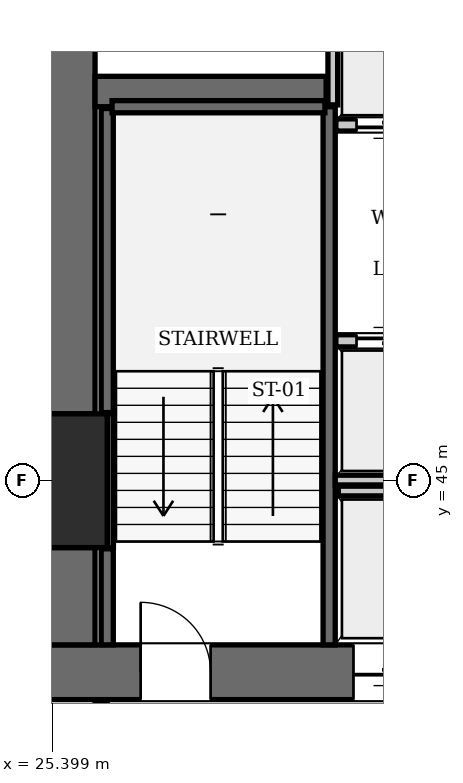
"""IFC4 building model, lengths in metres.
Left out: names, types, materials, properties, quantities, classifications, styles, units other than length and angle.
Written with IfcOpenShell. Run it as: python <this file> out.ifc"""

import sys

from ifc_helpers import new_model, si_unit, direction, frame, frame_2d, origin, origin_2d, place, context, subcontext, project, spatial, rectangle, extrude, element, fill, save


model = new_model("IFC4")
c1 = context("Model", 3, precision=1e-05, world=origin(), true_north=direction((0.0, 1.0)))
c2 = subcontext(c1, "Body", "Model", "MODEL_VIEW")
j1 = project(units=[si_unit("LENGTHUNIT", "METRE"), si_unit("PLANEANGLEUNIT", "RADIAN")], contexts=[c1])
p1 = place(None, origin())
s1 = spatial("IfcSite", under=j1, at=p1, CompositionType="ELEMENT")
p2 = place(p1, origin())
s2 = spatial("IfcBuilding", under=s1, at=p2, CompositionType="ELEMENT")
p3 = place(p2, frame((0.0, 0.0, 34.65)))
s3 = spatial("IfcBuildingStorey", under=s2, at=p3, CompositionType="ELEMENT", Elevation=34.65)
p4 = place(p3, frame((25.2, 45.0, 0.0), z_axis=(0.0, 0.0, 1.0), x_axis=(1.0, 0.0, 0.0)))
e1 = element("IfcColumn", 1, at=p4, inside=s3, PredefinedType="COLUMN", context=c2, shape_type="SweptSolid", body=[
    extrude(rectangle(XDim=2.2, YDim=2.2, at=origin_2d()), origin(), (0.0, 0.0, 1.0), 3.85),
])
p5 = place(p3, frame((25.2, 41.85, 0.0), z_axis=(0.0, 0.0, 1.0), x_axis=(1.0, 0.0, 0.0)))
e2 = element("IfcWall", 2, at=p5, inside=s3, PredefinedType="SHEAR", context=c2, shape_type="SweptSolid", body=[
    extrude(rectangle(XDim=6.8, YDim=0.9, at=frame_2d((3.4, 0.0))), origin(), (0.0, 0.0, 1.0), 3.85),
])
p6 = place(p5, frame((1.65, 0.0, 0.0)))
e3 = element("IfcOpeningElement", 3, at=p6, cuts=e2, PredefinedType="OPENING", context=c2, shape_type="SweptSolid", body=[
    extrude(rectangle(XDim=1.15, YDim=2.15, at=frame_2d((0.575, 1.075))), frame((0.0, 0.46, 0.0), z_axis=(0.0, -1.0, 0.0), x_axis=(1.0, 0.0, 0.0)), (0.0, 0.0, 1.0), 0.92),
])
p7 = place(p5, frame((5.15, 0.0, 0.0)))
e4 = element("IfcOpeningElement", 4, at=p7, cuts=e2, PredefinedType="OPENING", context=c2, shape_type="SweptSolid", body=[
    extrude(rectangle(XDim=1.1, YDim=2.2, at=frame_2d((0.55, 1.1))), frame((0.0, 0.46, 0.0), z_axis=(0.0, -1.0, 0.0), x_axis=(1.0, 0.0, 0.0)), (0.0, 0.0, 1.0), 0.92),
])
p8 = place(p3, frame((25.65, 42.3, 0.0), z_axis=(0.0, 0.0, 1.0), x_axis=(0.0, 1.0, 0.0)))
e5 = element("IfcWall", 5, at=p8, inside=s3, PredefinedType="SHEAR", context=c2, shape_type="SweptSolid", body=[
    extrude(rectangle(XDim=1.6, YDim=0.9, at=frame_2d((0.8, 0.0))), origin(), (0.0, 0.0, 1.0), 3.85),
])
p9 = place(p3, frame((25.65, 46.1, 0.0), z_axis=(0.0, 0.0, 1.0), x_axis=(0.0, 1.0, 0.0)))
e6 = element("IfcWall", 6, at=p9, inside=s3, PredefinedType="SHEAR", context=c2, shape_type="SweptSolid", body=[
    extrude(rectangle(XDim=7.0, YDim=0.9, at=frame_2d((3.5, 0.0))), origin(), (0.0, 0.0, 1.0), 3.85),
])
p10 = place(p3, frame((26.1, 51.4, 0.0), z_axis=(0.0, 0.0, 1.0), x_axis=(1.0, 0.0, 0.0)))
e7 = element("IfcWall", 7, at=p10, inside=s3, PredefinedType="SHEAR", context=c2, shape_type="SweptSolid", body=[
    extrude(rectangle(XDim=3.8, YDim=0.5, at=frame_2d((1.9, 0.0))), origin(), (0.0, 0.0, 1.0), 3.85),
])
p11 = place(p3, frame((29.95, 42.3, 0.0), z_axis=(0.0, 0.0, 1.0), x_axis=(0.0, 1.0, 0.0)))
e8 = element("IfcWall", 8, at=p11, inside=s3, PredefinedType="SOLIDWALL", context=c2, shape_type="SweptSolid", body=[
    extrude(rectangle(XDim=8.85, YDim=0.2, at=frame_2d((4.425, 0.0))), origin(), (0.0, 0.0, 1.0), 3.61),
])
p12 = place(p3, frame((26.3, 42.3, 0.0), z_axis=(0.0, 0.0, 1.0), x_axis=(0.0, 1.0, 0.0)))
e9 = element("IfcWall", 9, at=p12, inside=s3, PredefinedType="SOLIDWALL", context=c2, shape_type="SweptSolid", body=[
    extrude(rectangle(XDim=1.58, YDim=0.2, at=frame_2d((0.79, 0.0))), origin(), (0.0, 0.0, 1.0), 3.61),
])
p13 = place(p3, frame((26.3, 46.12, 0.0), z_axis=(0.0, 0.0, 1.0), x_axis=(0.0, 1.0, 0.0)))
e10 = element("IfcWall", 10, at=p13, inside=s3, PredefinedType="SOLIDWALL", context=c2, shape_type="SweptSolid", body=[
    extrude(rectangle(XDim=5.0, YDim=0.2, at=frame_2d((2.5, 0.0))), origin(), (0.0, 0.0, 1.0), 3.61),
])
p14 = place(p3, frame((26.38, 51.15, 0.0), z_axis=(0.0, 0.0, 1.0), x_axis=(1.0, 0.0, 0.0)))
e11 = element("IfcWall", 11, at=p14, inside=s3, PredefinedType="SOLIDWALL", context=c2, shape_type="SweptSolid", body=[
    extrude(rectangle(XDim=3.5, YDim=0.2, at=frame_2d((1.75, 0.0))), origin(), (0.0, 0.0, 1.0), 3.61),
])
p15 = place(p3, frame((26.352, 43.9, 0.0), z_axis=(0.0, 0.0, 1.0), x_axis=(0.0, 1.0, 0.0)))
e12 = element("IfcWall", 12, at=p15, inside=s3, PredefinedType="SOLIDWALL", context=c2, shape_type="SweptSolid", body=[
    extrude(rectangle(XDim=2.2, YDim=0.1, at=frame_2d((1.1, 0.0))), origin(), (0.0, 0.0, 1.0), 3.61),
])
p16 = place(p3, frame((30.06, 47.3, 0.0), z_axis=(0.0, 0.0, 1.0), x_axis=(1.0, 0.0, 0.0)))
e13 = element("IfcWall", 13, at=p16, inside=s3, PredefinedType="SOLIDWALL", context=c2, shape_type="SweptSolid", body=[
    extrude(rectangle(XDim=1.68, YDim=0.2, at=frame_2d((0.84, 0.0))), origin(), (0.0, 0.0, 1.0), 3.61),
])
p17 = place(p16, frame((0.34, 0.0, 0.0)))
e14 = element("IfcOpeningElement", 14, at=p17, cuts=e13, PredefinedType="OPENING", context=c2, shape_type="SweptSolid", body=[
    extrude(rectangle(XDim=1.0, YDim=2.15, at=frame_2d((0.5, 1.075))), frame((0.0, 0.11, 0.0), z_axis=(0.0, -1.0, 0.0), x_axis=(1.0, 0.0, 0.0)), (0.0, 0.0, 1.0), 0.22),
])
p18 = place(p3, frame((30.06, 50.85, 0.0), z_axis=(0.0, 0.0, 1.0), x_axis=(1.0, 0.0, 0.0)))
e15 = element("IfcWall", 15, at=p18, inside=s3, PredefinedType="SOLIDWALL", context=c2, shape_type="SweptSolid", body=[
    extrude(rectangle(XDim=1.68, YDim=0.2, at=frame_2d((0.84, 0.0))), origin(), (0.0, 0.0, 1.0), 3.61),
])
p19 = place(p18, frame((0.34, 0.0, 0.0)))
e16 = element("IfcOpeningElement", 16, at=p19, cuts=e15, PredefinedType="OPENING", context=c2, shape_type="SweptSolid", body=[
    extrude(rectangle(XDim=1.0, YDim=2.15, at=frame_2d((0.5, 1.075))), frame((0.0, 0.11, 0.0), z_axis=(0.0, -1.0, 0.0), x_axis=(1.0, 0.0, 0.0)), (0.0, 0.0, 1.0), 0.22),
])
p20 = place(p3, frame((30.1, 44.83, 0.0), z_axis=(0.0, 0.0, 1.0), x_axis=(1.0, 0.0, 0.0)))
e17 = element("IfcWall", 17, at=p20, inside=s3, PredefinedType="SOLIDWALL", context=c2, shape_type="SweptSolid", body=[
    extrude(rectangle(XDim=1.6, YDim=0.16, at=frame_2d((0.8, 0.0))), origin(), (0.0, 0.0, 1.0), 3.61),
])
p21 = place(p3, frame((30.05, 45.01, 0.0), z_axis=(0.0, 0.0, 1.0), x_axis=(1.0, 0.0, 0.0)))
e18 = element("IfcWall", 18, at=p21, inside=s3, PredefinedType="SOLIDWALL", context=c2, shape_type="SweptSolid", body=[
    extrude(rectangle(XDim=3.45, YDim=0.16, at=frame_2d((1.725, 0.0))), origin(), (0.0, 0.0, 1.0), 3.61),
])
p22 = place(p3, frame((30.01, 51.18, 0.0), z_axis=(0.0, 0.0, 1.0), x_axis=(0.0, 1.0, 0.0)))
e19 = element("IfcWall", 19, at=p22, inside=s3, PredefinedType="SOLIDWALL", context=c2, shape_type="SweptSolid", body=[
    extrude(rectangle(XDim=1.92, YDim=0.16, at=frame_2d((0.96, 0.0))), origin(), (0.0, 0.0, 1.0), 3.61),
])
p23 = place(p3, frame((26.2, 38.31, 0.0), z_axis=(0.0, 0.0, 1.0), x_axis=(0.0, 1.0, 0.0)))
e20 = element("IfcWall", 20, at=p23, inside=s3, PredefinedType="PARTITIONING", context=c2, shape_type="SweptSolid", body=[
    extrude(rectangle(XDim=3.07, YDim=0.2, at=frame_2d((1.535, 0.0))), origin(), (0.0, 0.0, 1.0), 3.61),
])
p24 = place(p6, origin())
e21 = element("IfcDoor", 21, at=p24, inside=s3, OperationType="SINGLE_SWING_LEFT", PredefinedType="DOOR", context=c2, shape_type="SweptSolid", body=[
    extrude(rectangle(XDim=1.15, YDim=2.15, at=frame_2d((0.575, 1.075))), frame((0.0, 0.025, 0.0), z_axis=(0.0, -1.0, 0.0), x_axis=(1.0, 0.0, 0.0)), (0.0, 0.0, 1.0), 0.05),
])
fill(e3, e21)
p25 = place(p17, origin())
e22 = element("IfcDoor", 22, at=p25, inside=s3, OperationType="SLIDING_TO_LEFT", PredefinedType="DOOR", context=c2, shape_type="SweptSolid", body=[
    extrude(rectangle(XDim=1.0, YDim=2.15, at=frame_2d((0.5, 1.075))), frame((0.0, 0.025, 0.0), z_axis=(0.0, -1.0, 0.0), x_axis=(1.0, 0.0, 0.0)), (0.0, 0.0, 1.0), 0.05),
])
fill(e14, e22)
p26 = place(p19, frame((1.0, 0.0, 0.0), z_axis=(0.0, 0.0, 1.0), x_axis=(-1.0, 0.0, 0.0)))
e23 = element("IfcDoor", 23, at=p26, inside=s3, OperationType="SLIDING_TO_LEFT", PredefinedType="DOOR", context=c2, shape_type="SweptSolid", body=[
    extrude(rectangle(XDim=1.0, YDim=2.15, at=frame_2d((0.5, 1.075))), frame((0.0, 0.025, 0.0), z_axis=(0.0, -1.0, 0.0), x_axis=(1.0, 0.0, 0.0)), (0.0, 0.0, 1.0), 0.05),
])
fill(e16, e23)
p27 = place(p7, frame((1.1, 0.0, 0.0), z_axis=(0.0, 0.0, 1.0), x_axis=(-1.0, 0.0, 0.0)))
e24 = element("IfcDoor", 24, at=p27, inside=s3, OperationType="SLIDING_TO_LEFT", PredefinedType="DOOR", context=c2, shape_type="SweptSolid", body=[
    extrude(rectangle(XDim=1.1, YDim=2.2, at=frame_2d((0.55, 1.1))), frame((0.0, 0.025, 0.0), z_axis=(0.0, -1.0, 0.0), x_axis=(1.0, 0.0, 0.0)), (0.0, 0.0, 1.0), 0.05),
])
fill(e4, e24)
save(model, sys.argv[1])
